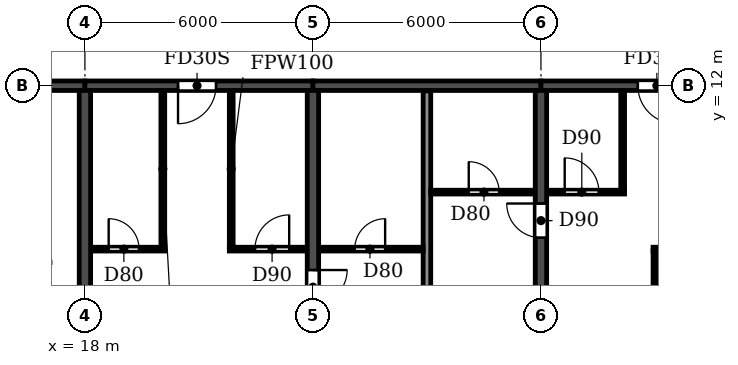
"""IFC4 building model, lengths in metres.
Left out: names, types, materials, properties, quantities, classifications, styles, units other than length and angle.
Written with IfcOpenShell. Run it as: python <this file> out.ifc"""

import sys

from ifc_helpers import new_model, si_unit, direction, frame, frame_2d, origin, place, context, subcontext, project, spatial, rectangle, extrude, element, fill, save


model = new_model("IFC4")
c1 = context("Model", 3, precision=1e-05, world=origin(), true_north=direction((0.0, 1.0)))
c2 = subcontext(c1, "Body", "Model", "MODEL_VIEW")
j1 = project(units=[si_unit("LENGTHUNIT", "METRE"), si_unit("PLANEANGLEUNIT", "RADIAN")], contexts=[c1])
p1 = place(None, origin())
s1 = spatial("IfcSite", under=j1, at=p1, CompositionType="ELEMENT")
p2 = place(p1, origin())
s2 = spatial("IfcBuilding", under=s1, at=p2, CompositionType="ELEMENT")
p3 = place(p2, frame((0.0, 0.0, 125.7)))
s3 = spatial("IfcBuildingStorey", under=s2, at=p3, CompositionType="ELEMENT", Elevation=125.7)
p4 = place(p3, frame((18.0, 0.2, 0.0), z_axis=(0.0, 0.0, 1.0), x_axis=(0.0, 1.0, 0.0)))
e1 = element("IfcWall", 1, at=p4, inside=s3, PredefinedType="SHEAR", context=c2, shape_type="SweptSolid", body=[
    extrude(rectangle(XDim=11.675, YDim=0.3, at=frame_2d((5.837, 0.0))), origin(), (0.0, 0.0, 1.0), 3.07),
])
p5 = place(p3, frame((24.0, 0.2, 0.0), z_axis=(0.0, 0.0, 1.0), x_axis=(0.0, 1.0, 0.0)))
e2 = element("IfcWall", 2, at=p5, inside=s3, PredefinedType="SHEAR", context=c2, shape_type="SweptSolid", body=[
    extrude(rectangle(XDim=11.675, YDim=0.3, at=frame_2d((5.837, 0.0))), origin(), (0.0, 0.0, 1.0), 3.07),
])
p6 = place(p5, frame((6.05, 0.0, 0.0)))
e3 = element("IfcOpeningElement", 3, at=p6, cuts=e2, PredefinedType="OPENING", context=c2, shape_type="SweptSolid", body=[
    extrude(rectangle(XDim=0.9, YDim=2.1, at=frame_2d((0.45, 1.05))), frame((0.0, 0.16, 0.0), z_axis=(0.0, -1.0, 0.0), x_axis=(1.0, 0.0, 0.0)), (0.0, 0.0, 1.0), 0.32),
])
p7 = place(p3, frame((30.0, 0.2, 0.0), z_axis=(0.0, 0.0, 1.0), x_axis=(0.0, 1.0, 0.0)))
e4 = element("IfcWall", 4, at=p7, inside=s3, PredefinedType="SHEAR", context=c2, shape_type="SweptSolid", body=[
    extrude(rectangle(XDim=11.675, YDim=0.3, at=frame_2d((5.837, 0.0))), origin(), (0.0, 0.0, 1.0), 3.07),
])
p8 = place(p7, frame((7.8, 0.0, 0.0)))
e5 = element("IfcOpeningElement", 5, at=p8, cuts=e4, PredefinedType="OPENING", context=c2, shape_type="SweptSolid", body=[
    extrude(rectangle(XDim=0.9, YDim=2.1, at=frame_2d((0.45, 1.05))), frame((0.0, 0.16, 0.0), z_axis=(0.0, -1.0, 0.0), x_axis=(1.0, 0.0, 0.0)), (0.0, 0.0, 1.0), 0.32),
])
p9 = place(p3, frame((12.2, 12.0, 0.0), z_axis=(0.0, 0.0, 1.0), x_axis=(1.0, 0.0, 0.0)))
e6 = element("IfcWall", 6, at=p9, inside=s3, PredefinedType="SHEAR", context=c2, shape_type="SweptSolid", body=[
    extrude(rectangle(XDim=5.8, YDim=0.25, at=frame_2d((2.9, 0.0))), origin(), (0.0, 0.0, 1.0), 2.47),
])
p10 = place(p9, frame((2.3, 0.0, 0.0)))
e7 = element("IfcOpeningElement", 7, at=p10, cuts=e6, PredefinedType="OPENING", context=c2, shape_type="SweptSolid", body=[
    extrude(rectangle(XDim=1.0, YDim=2.1, at=frame_2d((0.5, 1.05))), frame((0.0, 0.135, 0.0), z_axis=(0.0, -1.0, 0.0), x_axis=(1.0, 0.0, 0.0)), (0.0, 0.0, 1.0), 0.27),
])
p11 = place(p3, frame((18.0, 12.0, 0.0), z_axis=(0.0, 0.0, 1.0), x_axis=(1.0, 0.0, 0.0)))
e8 = element("IfcWall", 8, at=p11, inside=s3, PredefinedType="SHEAR", context=c2, shape_type="SweptSolid", body=[
    extrude(rectangle(XDim=6.0, YDim=0.25, at=frame_2d((3.0, 0.0))), origin(), (0.0, 0.0, 1.0), 2.47),
])
p12 = place(p11, frame((2.45, 0.0, 0.0)))
e9 = element("IfcOpeningElement", 9, at=p12, cuts=e8, PredefinedType="OPENING", context=c2, shape_type="SweptSolid", body=[
    extrude(rectangle(XDim=1.0, YDim=2.1, at=frame_2d((0.5, 1.05))), frame((0.0, 0.135, 0.0), z_axis=(0.0, -1.0, 0.0), x_axis=(1.0, 0.0, 0.0)), (0.0, 0.0, 1.0), 0.27),
])
p13 = place(p3, frame((24.0, 12.0, 0.0), z_axis=(0.0, 0.0, 1.0), x_axis=(1.0, 0.0, 0.0)))
e10 = element("IfcWall", 10, at=p13, inside=s3, PredefinedType="SHEAR", context=c2, shape_type="SweptSolid", body=[
    extrude(rectangle(XDim=6.0, YDim=0.25, at=frame_2d((3.0, 0.0))), origin(), (0.0, 0.0, 1.0), 2.47),
])
p14 = place(p3, frame((30.0, 12.0, 0.0), z_axis=(0.0, 0.0, 1.0), x_axis=(1.0, 0.0, 0.0)))
e11 = element("IfcWall", 11, at=p14, inside=s3, PredefinedType="SHEAR", context=c2, shape_type="SweptSolid", body=[
    extrude(rectangle(XDim=6.0, YDim=0.25, at=frame_2d((3.0, 0.0))), origin(), (0.0, 0.0, 1.0), 2.47),
])
p15 = place(p14, frame((2.55, 0.0, 0.0)))
e12 = element("IfcOpeningElement", 12, at=p15, cuts=e11, PredefinedType="OPENING", context=c2, shape_type="SweptSolid", body=[
    extrude(rectangle(XDim=1.0, YDim=2.1, at=frame_2d((0.5, 1.05))), frame((0.0, 0.135, 0.0), z_axis=(0.0, -1.0, 0.0), x_axis=(1.0, 0.0, 0.0)), (0.0, 0.0, 1.0), 0.27),
])
p16 = place(p3, frame((27.0, 0.06, 0.0), z_axis=(0.0, 0.0, 1.0), x_axis=(0.0, 1.0, 0.0)))
e13 = element("IfcWall", 13, at=p16, inside=s3, PredefinedType="PARTITIONING", context=c2, shape_type="SweptSolid", body=[
    extrude(rectangle(XDim=11.805, YDim=0.2, at=frame_2d((5.902, 0.0))), origin(), (0.0, 0.0, 1.0), 3.07),
])
p17 = place(p3, frame((18.16, 7.7, 0.0), z_axis=(0.0, 0.0, 1.0), x_axis=(1.0, 0.0, 0.0)))
e14 = element("IfcWall", 14, at=p17, inside=s3, PredefinedType="PARTITIONING", context=c2, shape_type="SweptSolid", body=[
    extrude(rectangle(XDim=1.94, YDim=0.1, at=frame_2d((0.97, 0.0))), origin(), (0.0, 0.0, 1.0), 3.07),
])
p18 = place(p17, frame((0.465, 0.0, 0.0)))
e15 = element("IfcOpeningElement", 15, at=p18, cuts=e14, PredefinedType="OPENING", context=c2, shape_type="SweptSolid", body=[
    extrude(rectangle(XDim=0.8, YDim=2.1, at=frame_2d((0.4, 1.05))), frame((0.0, 0.06, 0.0), z_axis=(0.0, -1.0, 0.0), x_axis=(1.0, 0.0, 0.0)), (0.0, 0.0, 1.0), 0.12),
])
p19 = place(p3, frame((21.8, 7.7, 0.0), z_axis=(0.0, 0.0, 1.0), x_axis=(1.0, 0.0, 0.0)))
e16 = element("IfcWall", 16, at=p19, inside=s3, PredefinedType="PARTITIONING", context=c2, shape_type="SweptSolid", body=[
    extrude(rectangle(XDim=2.04, YDim=0.1, at=frame_2d((1.02, 0.0))), origin(), (0.0, 0.0, 1.0), 3.07),
])
p20 = place(p19, frame((0.675, 0.0, 0.0)))
e17 = element("IfcOpeningElement", 17, at=p20, cuts=e16, PredefinedType="OPENING", context=c2, shape_type="SweptSolid", body=[
    extrude(rectangle(XDim=0.9, YDim=2.1, at=frame_2d((0.45, 1.05))), frame((0.0, 0.06, 0.0), z_axis=(0.0, -1.0, 0.0), x_axis=(1.0, 0.0, 0.0)), (0.0, 0.0, 1.0), 0.12),
])
p21 = place(p3, frame((24.16, 7.7, 0.0), z_axis=(0.0, 0.0, 1.0), x_axis=(1.0, 0.0, 0.0)))
e18 = element("IfcWall", 18, at=p21, inside=s3, PredefinedType="PARTITIONING", context=c2, shape_type="SweptSolid", body=[
    extrude(rectangle(XDim=2.74, YDim=0.1, at=frame_2d((1.37, 0.0))), origin(), (0.0, 0.0, 1.0), 3.07),
])
p22 = place(p21, frame((0.94, 0.0, 0.0)))
e19 = element("IfcOpeningElement", 19, at=p22, cuts=e18, PredefinedType="OPENING", context=c2, shape_type="SweptSolid", body=[
    extrude(rectangle(XDim=0.8, YDim=2.1, at=frame_2d((0.4, 1.05))), frame((0.0, 0.06, 0.0), z_axis=(0.0, -1.0, 0.0), x_axis=(1.0, 0.0, 0.0)), (0.0, 0.0, 1.0), 0.12),
])
p23 = place(p3, frame((32.95, 7.7, 0.0), z_axis=(0.0, 0.0, 1.0), x_axis=(1.0, 0.0, 0.0)))
e20 = element("IfcWall", 20, at=p23, inside=s3, PredefinedType="PARTITIONING", context=c2, shape_type="SweptSolid", body=[
    extrude(rectangle(XDim=2.89, YDim=0.1, at=frame_2d((1.445, 0.0))), origin(), (0.0, 0.0, 1.0), 3.07),
])
p24 = place(p23, frame((1.65, 0.0, 0.0)))
e21 = element("IfcOpeningElement", 21, at=p24, cuts=e20, PredefinedType="OPENING", context=c2, shape_type="SweptSolid", body=[
    extrude(rectangle(XDim=0.9, YDim=2.1, at=frame_2d((0.45, 1.05))), frame((0.0, 0.06, 0.0), z_axis=(0.0, -1.0, 0.0), x_axis=(1.0, 0.0, 0.0)), (0.0, 0.0, 1.0), 0.12),
])
p25 = place(p3, frame((27.1, 9.2, 0.0), z_axis=(0.0, 0.0, 1.0), x_axis=(1.0, 0.0, 0.0)))
e22 = element("IfcWall", 22, at=p25, inside=s3, PredefinedType="PARTITIONING", context=c2, shape_type="SweptSolid", body=[
    extrude(rectangle(XDim=2.74, YDim=0.1, at=frame_2d((1.37, 0.0))), origin(), (0.0, 0.0, 1.0), 3.07),
])
p26 = place(p25, frame((1.0, 0.0, 0.0)))
e23 = element("IfcOpeningElement", 23, at=p26, cuts=e22, PredefinedType="OPENING", context=c2, shape_type="SweptSolid", body=[
    extrude(rectangle(XDim=0.8, YDim=2.1, at=frame_2d((0.4, 1.05))), frame((0.0, 0.06, 0.0), z_axis=(0.0, -1.0, 0.0), x_axis=(1.0, 0.0, 0.0)), (0.0, 0.0, 1.0), 0.12),
])
p27 = place(p3, frame((30.16, 9.2, 0.0), z_axis=(0.0, 0.0, 1.0), x_axis=(1.0, 0.0, 0.0)))
e24 = element("IfcWall", 24, at=p27, inside=s3, PredefinedType="PARTITIONING", context=c2, shape_type="SweptSolid", body=[
    extrude(rectangle(XDim=2.04, YDim=0.1, at=frame_2d((1.02, 0.0))), origin(), (0.0, 0.0, 1.0), 3.07),
])
p28 = place(p27, frame((0.465, 0.0, 0.0)))
e25 = element("IfcOpeningElement", 25, at=p28, cuts=e24, PredefinedType="OPENING", context=c2, shape_type="SweptSolid", body=[
    extrude(rectangle(XDim=0.9, YDim=2.1, at=frame_2d((0.45, 1.05))), frame((0.0, 0.06, 0.0), z_axis=(0.0, -1.0, 0.0), x_axis=(1.0, 0.0, 0.0)), (0.0, 0.0, 1.0), 0.12),
])
for number, where, z_axis, x_axis in (
    (26, (20.05, 7.75, 0.0), (0.0, 0.0, 1.0), (0.0, 1.0, 0.0)),
    (27, (21.85, 7.75, 0.0), (0.0, 0.0, 1.0), (0.0, 1.0, 0.0)),
):
    element("IfcWall", number, at=place(p3, frame(where, z_axis=z_axis, x_axis=x_axis)), inside=s3, PredefinedType="PARTITIONING", context=c2, shape_type="SweptSolid", body=[
        extrude(rectangle(XDim=4.115, YDim=0.1, at=frame_2d((2.058, 0.0))), origin(), (0.0, 0.0, 1.0), 3.07),
    ])
p29 = place(p3, frame((32.15, 9.25, 0.0), z_axis=(0.0, 0.0, 1.0), x_axis=(0.0, 1.0, 0.0)))
e28 = element("IfcWall", 28, at=p29, inside=s3, PredefinedType="PARTITIONING", context=c2, shape_type="SweptSolid", body=[
    extrude(rectangle(XDim=2.615, YDim=0.1, at=frame_2d((1.308, 0.0))), origin(), (0.0, 0.0, 1.0), 3.07),
])
p30 = place(p3, frame((33.0, 0.06, 0.0), z_axis=(0.0, 0.0, 1.0), x_axis=(0.0, 1.0, 0.0)))
e29 = element("IfcWall", 29, at=p30, inside=s3, PredefinedType="PARTITIONING", context=c2, shape_type="SweptSolid", body=[
    extrude(rectangle(XDim=7.59, YDim=0.1, at=frame_2d((3.795, 0.0))), origin(), (0.0, 0.0, 1.0), 3.07),
])
p31 = place(p22, origin())
e30 = element("IfcDoor", 30, at=p31, inside=s3, OperationType="SINGLE_SWING_RIGHT", PredefinedType="DOOR", context=c2, shape_type="SweptSolid", body=[
    extrude(rectangle(XDim=0.8, YDim=2.1, at=frame_2d((0.4, 1.05))), frame((0.0, 0.025, 0.0), z_axis=(0.0, -1.0, 0.0), x_axis=(1.0, 0.0, 0.0)), (0.0, 0.0, 1.0), 0.05),
])
fill(e19, e30)
p32 = place(p18, origin())
e31 = element("IfcDoor", 31, at=p32, inside=s3, OperationType="SINGLE_SWING_LEFT", PredefinedType="DOOR", context=c2, shape_type="SweptSolid", body=[
    extrude(rectangle(XDim=0.8, YDim=2.1, at=frame_2d((0.4, 1.05))), frame((0.0, 0.025, 0.0), z_axis=(0.0, -1.0, 0.0), x_axis=(1.0, 0.0, 0.0)), (0.0, 0.0, 1.0), 0.05),
])
fill(e15, e31)
p33 = place(p12, frame((1.0, 0.0, 0.0), z_axis=(0.0, 0.0, 1.0), x_axis=(-1.0, 0.0, 0.0)))
e32 = element("IfcDoor", 32, at=p33, inside=s3, OperationType="SINGLE_SWING_RIGHT", PredefinedType="DOOR", context=c2, shape_type="SweptSolid", body=[
    extrude(rectangle(XDim=1.0, YDim=2.1, at=frame_2d((0.5, 1.05))), frame((0.0, 0.025, 0.0), z_axis=(0.0, -1.0, 0.0), x_axis=(1.0, 0.0, 0.0)), (0.0, 0.0, 1.0), 0.05),
])
fill(e9, e32)
p34 = place(p20, origin())
e33 = element("IfcDoor", 33, at=p34, inside=s3, OperationType="SINGLE_SWING_RIGHT", PredefinedType="DOOR", context=c2, shape_type="SweptSolid", body=[
    extrude(rectangle(XDim=0.9, YDim=2.1, at=frame_2d((0.45, 1.05))), frame((0.0, 0.025, 0.0), z_axis=(0.0, -1.0, 0.0), x_axis=(1.0, 0.0, 0.0)), (0.0, 0.0, 1.0), 0.05),
])
fill(e17, e33)
p35 = place(p6, frame((0.9, 0.0, 0.0), z_axis=(0.0, 0.0, 1.0), x_axis=(-1.0, 0.0, 0.0)))
e34 = element("IfcDoor", 34, at=p35, inside=s3, OperationType="SINGLE_SWING_LEFT", PredefinedType="DOOR", context=c2, shape_type="SweptSolid", body=[
    extrude(rectangle(XDim=0.9, YDim=2.1, at=frame_2d((0.45, 1.05))), frame((0.0, 0.025, 0.0), z_axis=(0.0, -1.0, 0.0), x_axis=(1.0, 0.0, 0.0)), (0.0, 0.0, 1.0), 0.05),
])
fill(e3, e34)
p36 = place(p26, origin())
e35 = element("IfcDoor", 35, at=p36, inside=s3, OperationType="SINGLE_SWING_LEFT", PredefinedType="DOOR", context=c2, shape_type="SweptSolid", body=[
    extrude(rectangle(XDim=0.8, YDim=2.1, at=frame_2d((0.4, 1.05))), frame((0.0, 0.025, 0.0), z_axis=(0.0, -1.0, 0.0), x_axis=(1.0, 0.0, 0.0)), (0.0, 0.0, 1.0), 0.05),
])
fill(e23, e35)
p37 = place(p8, origin())
e36 = element("IfcDoor", 36, at=p37, inside=s3, OperationType="SINGLE_SWING_RIGHT", PredefinedType="DOOR", context=c2, shape_type="SweptSolid", body=[
    extrude(rectangle(XDim=0.9, YDim=2.1, at=frame_2d((0.45, 1.05))), frame((0.0, 0.025, 0.0), z_axis=(0.0, -1.0, 0.0), x_axis=(1.0, 0.0, 0.0)), (0.0, 0.0, 1.0), 0.05),
])
fill(e5, e36)
p38 = place(p28, origin())
e37 = element("IfcDoor", 37, at=p38, inside=s3, OperationType="SINGLE_SWING_LEFT", PredefinedType="DOOR", context=c2, shape_type="SweptSolid", body=[
    extrude(rectangle(XDim=0.9, YDim=2.1, at=frame_2d((0.45, 1.05))), frame((0.0, 0.025, 0.0), z_axis=(0.0, -1.0, 0.0), x_axis=(1.0, 0.0, 0.0)), (0.0, 0.0, 1.0), 0.05),
])
fill(e25, e37)
p39 = place(p15, frame((1.0, 0.0, 0.0), z_axis=(0.0, 0.0, 1.0), x_axis=(-1.0, 0.0, 0.0)))
e38 = element("IfcDoor", 38, at=p39, inside=s3, OperationType="SINGLE_SWING_LEFT", PredefinedType="DOOR", context=c2, shape_type="SweptSolid", body=[
    extrude(rectangle(XDim=1.0, YDim=2.1, at=frame_2d((0.5, 1.05))), frame((0.0, 0.025, 0.0), z_axis=(0.0, -1.0, 0.0), x_axis=(1.0, 0.0, 0.0)), (0.0, 0.0, 1.0), 0.05),
])
fill(e12, e38)
save(model, sys.argv[1])
